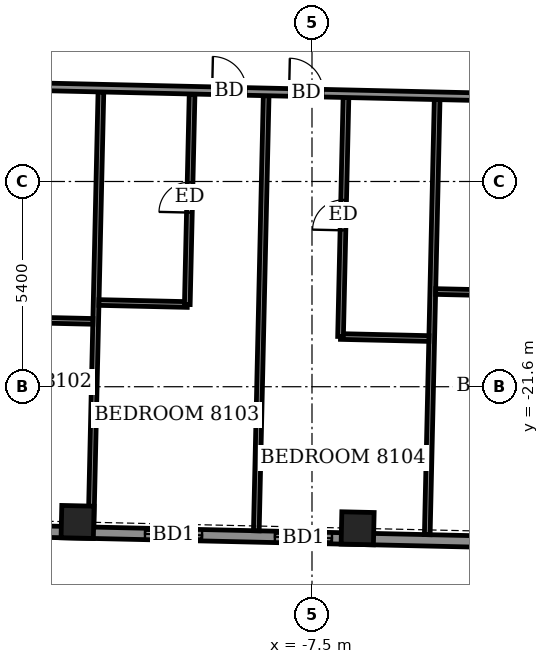
"""IFC4 building model, lengths in metres.
Left out: names, types, materials, properties, quantities, classifications, styles, units other than length and angle.
Written with IfcOpenShell. Run it as: python <this file> out.ifc"""

import sys

from ifc_helpers import new_model, si_unit, direction, frame, frame_2d, origin, origin_2d, place, context, subcontext, project, spatial, rectangle, extrude, element, fill, save


model = new_model("IFC4")
c1 = context("Model", 3, precision=1e-05, world=origin(), true_north=direction((0.0, 1.0)))
c2 = subcontext(c1, "Body", "Model", "MODEL_VIEW")
j1 = project(units=[si_unit("LENGTHUNIT", "METRE"), si_unit("PLANEANGLEUNIT", "RADIAN")], contexts=[c1])
p1 = place(None, origin())
s1 = spatial("IfcSite", under=j1, at=p1, CompositionType="ELEMENT")
p2 = place(p1, origin())
s2 = spatial("IfcBuilding", under=s1, at=p2, CompositionType="ELEMENT")
p3 = place(p2, frame((0.0, 0.0, 316.9)))
s3 = spatial("IfcBuildingStorey", under=s2, at=p3, CompositionType="ELEMENT", Elevation=316.9)
for number, where, z_axis, x_axis in (
    (1, (-13.668, -25.158, -0.55), (0.0, 0.0, 1.0), (1.0, -0.023, 0.0)),
    (2, (-6.299, -25.325, -0.55), (0.0, 0.0, 1.0), (1.0, -0.023, 0.0)),
):
    element("IfcColumn", number, at=place(p3, frame(where, z_axis=z_axis, x_axis=x_axis)), inside=s3, PredefinedType="COLUMN", context=c2, shape_type="SweptSolid", body=[
        extrude(rectangle(XDim=0.85, YDim=0.85, at=origin_2d()), origin(), (0.0, 0.0, 1.0), 3.6),
    ])
p4 = place(p3, frame((-28.264, -25.102, 0.0), z_axis=(0.0, 0.0, 1.0), x_axis=(0.999742520573, -0.022691244094, 0.0)))
e3 = element("IfcWall", 3, at=p4, inside=s3, PredefinedType="SOLIDWALL", context=c2, shape_type="SweptSolid", body=[
    extrude(rectangle(XDim=51.3, YDim=0.3, at=frame_2d((25.65, 0.0))), origin(), (0.0, 0.0, 1.0), 2.5),
])
p5 = place(p4, frame((2.455, 0.0, 0.0)))
e4 = element("IfcOpeningElement", 4, at=p5, cuts=e3, PredefinedType="OPENING", context=c2, shape_type="SweptSolid", body=[
    extrude(rectangle(XDim=1.5, YDim=2.4, at=frame_2d((0.75, 1.2))), frame((0.0, 0.16, 0.0), z_axis=(0.0, -1.0, 0.0), x_axis=(1.0, 0.0, 0.0)), (0.0, 0.0, 1.0), 0.32),
])
p6 = place(p4, frame((8.198, 0.0, 0.0)))
e5 = element("IfcOpeningElement", 5, at=p6, cuts=e3, PredefinedType="OPENING", context=c2, shape_type="SweptSolid", body=[
    extrude(rectangle(XDim=1.5, YDim=2.4, at=frame_2d((0.75, 1.2))), frame((0.0, 0.16, 0.0), z_axis=(0.0, -1.0, 0.0), x_axis=(1.0, 0.0, 0.0)), (0.0, 0.0, 1.0), 0.32),
])
p7 = place(p4, frame((11.709, 0.0, 0.0)))
e6 = element("IfcOpeningElement", 6, at=p7, cuts=e3, PredefinedType="OPENING", context=c2, shape_type="SweptSolid", body=[
    extrude(rectangle(XDim=1.5, YDim=2.4, at=frame_2d((0.75, 1.2))), frame((0.0, 0.16, 0.0), z_axis=(0.0, -1.0, 0.0), x_axis=(1.0, 0.0, 0.0)), (0.0, 0.0, 1.0), 0.32),
])
p8 = place(p4, frame((16.375, 0.0, 0.0)))
e7 = element("IfcOpeningElement", 7, at=p8, cuts=e3, PredefinedType="OPENING", context=c2, shape_type="SweptSolid", body=[
    extrude(rectangle(XDim=1.5, YDim=2.4, at=frame_2d((0.75, 1.2))), frame((0.0, 0.16, 0.0), z_axis=(0.0, -1.0, 0.0), x_axis=(1.0, 0.0, 0.0)), (0.0, 0.0, 1.0), 0.32),
])
p9 = place(p4, frame((19.794, 0.0, 0.0)))
e8 = element("IfcOpeningElement", 8, at=p9, cuts=e3, PredefinedType="OPENING", context=c2, shape_type="SweptSolid", body=[
    extrude(rectangle(XDim=1.5, YDim=2.4, at=frame_2d((0.75, 1.2))), frame((0.0, 0.16, 0.0), z_axis=(0.0, -1.0, 0.0), x_axis=(1.0, 0.0, 0.0)), (0.0, 0.0, 1.0), 0.32),
])
p10 = place(p4, frame((25.175, 0.0, 0.0)))
e9 = element("IfcOpeningElement", 9, at=p10, cuts=e3, PredefinedType="OPENING", context=c2, shape_type="SweptSolid", body=[
    extrude(rectangle(XDim=1.5, YDim=2.4, at=frame_2d((0.75, 1.2))), frame((0.0, 0.16, 0.0), z_axis=(0.0, -1.0, 0.0), x_axis=(1.0, 0.0, 0.0)), (0.0, 0.0, 1.0), 0.32),
])
p11 = place(p4, frame((30.305, 0.0, 0.0)))
e10 = element("IfcOpeningElement", 10, at=p11, cuts=e3, PredefinedType="OPENING", context=c2, shape_type="SweptSolid", body=[
    extrude(rectangle(XDim=1.5, YDim=2.4, at=frame_2d((0.75, 1.2))), frame((0.0, 0.16, 0.0), z_axis=(0.0, -1.0, 0.0), x_axis=(1.0, 0.0, 0.0)), (0.0, 0.0, 1.0), 0.32),
])
p12 = place(p4, frame((33.816, 0.0, 0.0)))
e11 = element("IfcOpeningElement", 11, at=p12, cuts=e3, PredefinedType="OPENING", context=c2, shape_type="SweptSolid", body=[
    extrude(rectangle(XDim=1.5, YDim=2.4, at=frame_2d((0.75, 1.2))), frame((0.0, 0.16, 0.0), z_axis=(0.0, -1.0, 0.0), x_axis=(1.0, 0.0, 0.0)), (0.0, 0.0, 1.0), 0.32),
])
p13 = place(p4, frame((38.6, 0.0, 0.0)))
e12 = element("IfcOpeningElement", 12, at=p13, cuts=e3, PredefinedType="OPENING", context=c2, shape_type="SweptSolid", body=[
    extrude(rectangle(XDim=1.5, YDim=2.4, at=frame_2d((0.75, 1.2))), frame((0.0, 0.16, 0.0), z_axis=(0.0, -1.0, 0.0), x_axis=(1.0, 0.0, 0.0)), (0.0, 0.0, 1.0), 0.32),
])
p14 = place(p4, frame((42.002, 0.0, 0.0)))
e13 = element("IfcOpeningElement", 13, at=p14, cuts=e3, PredefinedType="OPENING", context=c2, shape_type="SweptSolid", body=[
    extrude(rectangle(XDim=1.5, YDim=2.4, at=frame_2d((0.75, 1.2))), frame((0.0, 0.16, 0.0), z_axis=(0.0, -1.0, 0.0), x_axis=(1.0, 0.0, 0.0)), (0.0, 0.0, 1.0), 0.32),
])
p15 = place(p4, frame((47.228, 0.0, 0.9)))
e14 = element("IfcOpeningElement", 14, at=p15, cuts=e3, PredefinedType="OPENING", context=c2, shape_type="SweptSolid", body=[
    extrude(rectangle(XDim=2.4, YDim=1.5, at=frame_2d((1.2, 0.75))), frame((0.0, 0.16, 0.0), z_axis=(0.0, -1.0, 0.0), x_axis=(1.0, 0.0, 0.0)), (0.0, 0.0, 1.0), 0.32),
])
p16 = place(p3, frame((-13.314, -25.291, 0.0), z_axis=(0.0, 0.0, 1.0), x_axis=(0.022708327922, 0.999742132674, 0.0)))
e15 = element("IfcWall", 15, at=p16, inside=s3, PredefinedType="PARTITIONING", context=c2, shape_type="SweptSolid", body=[
    extrude(rectangle(XDim=11.45, YDim=0.15, at=frame_2d((5.725, 0.0))), origin(), (0.0, 0.0, 1.0), 2.5),
])
p17 = place(p3, frame((-8.965, -25.39, 0.0), z_axis=(0.0, 0.0, 1.0), x_axis=(0.022623564427, 0.999744054412, 0.0)))
e16 = element("IfcWall", 16, at=p17, inside=s3, PredefinedType="PARTITIONING", context=c2, shape_type="SweptSolid", body=[
    extrude(rectangle(XDim=11.45, YDim=0.15, at=frame_2d((5.725, 0.0))), origin(), (0.0, 0.0, 1.0), 2.5),
])
p18 = place(p3, frame((-4.467, -25.492, 0.0), z_axis=(0.0, 0.0, 1.0), x_axis=(0.022708327922, 0.999742132674, 0.0)))
e17 = element("IfcWall", 17, at=p18, inside=s3, PredefinedType="PARTITIONING", context=c2, shape_type="SweptSolid", body=[
    extrude(rectangle(XDim=11.45, YDim=0.15, at=frame_2d((5.725, 0.0))), origin(), (0.0, 0.0, 1.0), 2.5),
])
p19 = place(p3, frame((-6.749, -20.279, 0.0), z_axis=(0.0, 0.0, 1.0), x_axis=(0.999740478815, -0.022781023197, 0.0)))
e18 = element("IfcWall", 18, at=p19, inside=s3, PredefinedType="PARTITIONING", context=c2, shape_type="SweptSolid", body=[
    extrude(rectangle(XDim=2.325, YDim=0.15, at=frame_2d((1.163, 0.0))), origin(), (0.0, 0.0, 1.0), 3.05),
])
p20 = place(p3, frame((-6.749, -20.279, 0.0), z_axis=(0.0, 0.0, 1.0), x_axis=(0.02274256342, 0.999741354456, 0.0)))
e19 = element("IfcWall", 19, at=p20, inside=s3, PredefinedType="PARTITIONING", context=c2, shape_type="SweptSolid", body=[
    extrude(rectangle(XDim=6.291, YDim=0.15, at=frame_2d((3.146, 0.0))), origin(), (0.0, 0.0, 1.0), 3.05),
])
p21 = place(p20, frame((2.795, 0.0, 0.0)))
e20 = element("IfcOpeningElement", 20, at=p21, cuts=e19, PredefinedType="OPENING", context=c2, shape_type="SweptSolid", body=[
    extrude(rectangle(XDim=0.8, YDim=2.1, at=frame_2d((0.4, 1.05))), frame((0.0, 0.085, 0.0), z_axis=(0.0, -1.0, 0.0), x_axis=(1.0, 0.0, 0.0)), (0.0, 0.0, 1.0), 0.17),
])
p22 = place(p3, frame((-15.591, -19.828, 0.0), z_axis=(0.0, 0.0, 1.0), x_axis=(0.999738082346, -0.022885950011, 0.0)))
e21 = element("IfcWall", 21, at=p22, inside=s3, PredefinedType="PARTITIONING", context=c2, shape_type="SweptSolid", body=[
    extrude(rectangle(XDim=2.325, YDim=0.15, at=frame_2d((1.163, 0.0))), origin(), (0.0, 0.0, 1.0), 3.05),
])
p23 = place(p3, frame((-13.105, -19.384, 0.0), z_axis=(0.0, 0.0, 1.0), x_axis=(0.999740260747, -0.02279059109, 0.0)))
e22 = element("IfcWall", 22, at=p23, inside=s3, PredefinedType="PARTITIONING", context=c2, shape_type="SweptSolid", body=[
    extrude(rectangle(XDim=2.324, YDim=0.15, at=frame_2d((1.162, 0.0))), origin(), (0.0, 0.0, 1.0), 3.05),
])
p24 = place(p3, frame((-10.781, -19.437, 0.0), z_axis=(0.0, 0.0, 1.0), x_axis=(0.022741427977, 0.999741380285, 0.0)))
e23 = element("IfcWall", 23, at=p24, inside=s3, PredefinedType="PARTITIONING", context=c2, shape_type="SweptSolid", body=[
    extrude(rectangle(XDim=5.54, YDim=0.15, at=frame_2d((2.77, 0.0))), origin(), (0.0, 0.0, 1.0), 3.05),
])
p25 = place(p24, frame((2.42, 0.0, 0.0)))
e24 = element("IfcOpeningElement", 24, at=p25, cuts=e23, PredefinedType="OPENING", context=c2, shape_type="SweptSolid", body=[
    extrude(rectangle(XDim=0.8, YDim=2.1, at=frame_2d((0.4, 1.05))), frame((0.0, 0.085, 0.0), z_axis=(0.0, -1.0, 0.0), x_axis=(1.0, 0.0, 0.0)), (0.0, 0.0, 1.0), 0.17),
])
p26 = place(p3, frame((-4.246, -19.095, 0.0), z_axis=(0.0, 0.0, 1.0), x_axis=(0.999740260747, -0.02279059109, 0.0)))
e25 = element("IfcWall", 25, at=p26, inside=s3, PredefinedType="PARTITIONING", context=c2, shape_type="SweptSolid", body=[
    extrude(rectangle(XDim=2.324, YDim=0.15, at=frame_2d((1.162, 0.0))), origin(), (0.0, 0.0, 1.0), 3.05),
])
p27 = place(p3, frame((-31.347, -13.329, 0.0), z_axis=(0.0, 0.0, 1.0), x_axis=(0.999742613079, -0.022687168058, 0.0)))
e26 = element("IfcWall", 26, at=p27, inside=s3, PredefinedType="PARTITIONING", context=c2, shape_type="SweptSolid", body=[
    extrude(rectangle(XDim=58.799, YDim=0.2, at=frame_2d((29.399, 0.0))), origin(), (0.0, 0.0, 1.0), 3.05),
])
p28 = place(p27, frame((2.075, 0.0, 0.0)))
e27 = element("IfcOpeningElement", 27, at=p28, cuts=e26, PredefinedType="OPENING", context=c2, shape_type="SweptSolid", body=[
    extrude(rectangle(XDim=1.0, YDim=2.1, at=frame_2d((0.5, 1.05))), frame((0.0, 0.11, 0.0), z_axis=(0.0, -1.0, 0.0), x_axis=(1.0, 0.0, 0.0)), (0.0, 0.0, 1.0), 0.22),
])
p29 = place(p27, frame((7.5, 0.0, 0.0)))
e28 = element("IfcOpeningElement", 28, at=p29, cuts=e26, PredefinedType="OPENING", context=c2, shape_type="SweptSolid", body=[
    extrude(rectangle(XDim=0.9, YDim=2.1, at=frame_2d((0.45, 1.05))), frame((0.0, 0.11, 0.0), z_axis=(0.0, -1.0, 0.0), x_axis=(1.0, 0.0, 0.0)), (0.0, 0.0, 1.0), 0.22),
])
p30 = place(p27, frame((12.35, 0.0, 0.0)))
e29 = element("IfcOpeningElement", 29, at=p30, cuts=e26, PredefinedType="OPENING", context=c2, shape_type="SweptSolid", body=[
    extrude(rectangle(XDim=0.9, YDim=2.1, at=frame_2d((0.45, 1.05))), frame((0.0, 0.11, 0.0), z_axis=(0.0, -1.0, 0.0), x_axis=(1.0, 0.0, 0.0)), (0.0, 0.0, 1.0), 0.22),
])
p31 = place(p27, frame((14.425, 0.0, 0.0)))
e30 = element("IfcOpeningElement", 30, at=p31, cuts=e26, PredefinedType="OPENING", context=c2, shape_type="SweptSolid", body=[
    extrude(rectangle(XDim=0.9, YDim=2.1, at=frame_2d((0.45, 1.05))), frame((0.0, 0.11, 0.0), z_axis=(0.0, -1.0, 0.0), x_axis=(1.0, 0.0, 0.0)), (0.0, 0.0, 1.0), 0.22),
])
p32 = place(p27, frame((21.225, 0.0, 0.0)))
e31 = element("IfcOpeningElement", 31, at=p32, cuts=e26, PredefinedType="OPENING", context=c2, shape_type="SweptSolid", body=[
    extrude(rectangle(XDim=0.9, YDim=2.1, at=frame_2d((0.45, 1.05))), frame((0.0, 0.11, 0.0), z_axis=(0.0, -1.0, 0.0), x_axis=(1.0, 0.0, 0.0)), (0.0, 0.0, 1.0), 0.22),
])
p33 = place(p27, frame((23.25, 0.0, 0.0)))
e32 = element("IfcOpeningElement", 32, at=p33, cuts=e26, PredefinedType="OPENING", context=c2, shape_type="SweptSolid", body=[
    extrude(rectangle(XDim=0.9, YDim=2.1, at=frame_2d((0.45, 1.05))), frame((0.0, 0.11, 0.0), z_axis=(0.0, -1.0, 0.0), x_axis=(1.0, 0.0, 0.0)), (0.0, 0.0, 1.0), 0.22),
])
p34 = place(p27, frame((30.025, 0.0, 0.0)))
e33 = element("IfcOpeningElement", 33, at=p34, cuts=e26, PredefinedType="OPENING", context=c2, shape_type="SweptSolid", body=[
    extrude(rectangle(XDim=0.9, YDim=2.1, at=frame_2d((0.45, 1.05))), frame((0.0, 0.11, 0.0), z_axis=(0.0, -1.0, 0.0), x_axis=(1.0, 0.0, 0.0)), (0.0, 0.0, 1.0), 0.22),
])
p35 = place(p27, frame((32.025, 0.0, 0.0)))
e34 = element("IfcOpeningElement", 34, at=p35, cuts=e26, PredefinedType="OPENING", context=c2, shape_type="SweptSolid", body=[
    extrude(rectangle(XDim=0.9, YDim=2.1, at=frame_2d((0.45, 1.05))), frame((0.0, 0.11, 0.0), z_axis=(0.0, -1.0, 0.0), x_axis=(1.0, 0.0, 0.0)), (0.0, 0.0, 1.0), 0.22),
])
p36 = place(p27, frame((38.95, 0.0, 0.0)))
e35 = element("IfcOpeningElement", 35, at=p36, cuts=e26, PredefinedType="OPENING", context=c2, shape_type="SweptSolid", body=[
    extrude(rectangle(XDim=0.9, YDim=2.1, at=frame_2d((0.45, 1.05))), frame((0.0, 0.11, 0.0), z_axis=(0.0, -1.0, 0.0), x_axis=(1.0, 0.0, 0.0)), (0.0, 0.0, 1.0), 0.22),
])
p37 = place(p27, frame((41.05, 0.0, 0.0)))
e36 = element("IfcOpeningElement", 36, at=p37, cuts=e26, PredefinedType="OPENING", context=c2, shape_type="SweptSolid", body=[
    extrude(rectangle(XDim=0.9, YDim=2.1, at=frame_2d((0.45, 1.05))), frame((0.0, 0.11, 0.0), z_axis=(0.0, -1.0, 0.0), x_axis=(1.0, 0.0, 0.0)), (0.0, 0.0, 1.0), 0.22),
])
p38 = place(p27, frame((47.925, 0.0, 0.0)))
e37 = element("IfcOpeningElement", 37, at=p38, cuts=e26, PredefinedType="OPENING", context=c2, shape_type="SweptSolid", body=[
    extrude(rectangle(XDim=0.9, YDim=2.1, at=frame_2d((0.45, 1.05))), frame((0.0, 0.11, 0.0), z_axis=(0.0, -1.0, 0.0), x_axis=(1.0, 0.0, 0.0)), (0.0, 0.0, 1.0), 0.22),
])
p39 = place(p27, frame((53.618, 0.0, 0.0)))
e38 = element("IfcOpeningElement", 38, at=p39, cuts=e26, PredefinedType="OPENING", context=c2, shape_type="SweptSolid", body=[
    extrude(rectangle(XDim=1.0, YDim=2.1, at=frame_2d((0.5, 1.05))), frame((0.0, 0.11, 0.0), z_axis=(0.0, -1.0, 0.0), x_axis=(1.0, 0.0, 0.0)), (0.0, 0.0, 1.0), 0.22),
])
p40 = place(p8, origin())
e39 = element("IfcDoor", 39, at=p40, inside=s3, OperationType="SLIDING_TO_LEFT", PredefinedType="DOOR", context=c2, shape_type="SweptSolid", body=[
    extrude(rectangle(XDim=1.5, YDim=2.4, at=frame_2d((0.75, 1.2))), frame((0.0, 0.025, 0.0), z_axis=(0.0, -1.0, 0.0), x_axis=(1.0, 0.0, 0.0)), (0.0, 0.0, 1.0), 0.05),
])
fill(e7, e39)
p41 = place(p9, origin())
e40 = element("IfcDoor", 40, at=p41, inside=s3, OperationType="SLIDING_TO_LEFT", PredefinedType="DOOR", context=c2, shape_type="SweptSolid", body=[
    extrude(rectangle(XDim=1.5, YDim=2.4, at=frame_2d((0.75, 1.2))), frame((0.0, 0.025, 0.0), z_axis=(0.0, -1.0, 0.0), x_axis=(1.0, 0.0, 0.0)), (0.0, 0.0, 1.0), 0.05),
])
fill(e8, e40)
p42 = place(p32, origin())
e41 = element("IfcDoor", 41, at=p42, inside=s3, OperationType="SINGLE_SWING_LEFT", PredefinedType="DOOR", context=c2, shape_type="SweptSolid", body=[
    extrude(rectangle(XDim=0.9, YDim=2.1, at=frame_2d((0.45, 1.05))), frame((0.0, 0.025, 0.0), z_axis=(0.0, -1.0, 0.0), x_axis=(1.0, 0.0, 0.0)), (0.0, 0.0, 1.0), 0.05),
])
fill(e31, e41)
p43 = place(p25, origin())
e42 = element("IfcDoor", 42, at=p43, inside=s3, OperationType="SINGLE_SWING_LEFT", PredefinedType="DOOR", context=c2, shape_type="SweptSolid", body=[
    extrude(rectangle(XDim=0.8, YDim=2.1, at=frame_2d((0.4, 1.05))), frame((0.0, 0.025, 0.0), z_axis=(0.0, -1.0, 0.0), x_axis=(1.0, 0.0, 0.0)), (0.0, 0.0, 1.0), 0.05),
])
fill(e24, e42)
p44 = place(p33, origin())
e43 = element("IfcDoor", 43, at=p44, inside=s3, OperationType="SINGLE_SWING_RIGHT", PredefinedType="DOOR", context=c2, shape_type="SweptSolid", body=[
    extrude(rectangle(XDim=0.9, YDim=2.1, at=frame_2d((0.45, 1.05))), frame((0.0, 0.025, 0.0), z_axis=(0.0, -1.0, 0.0), x_axis=(1.0, 0.0, 0.0)), (0.0, 0.0, 1.0), 0.05),
])
fill(e32, e43)
p45 = place(p21, origin())
e44 = element("IfcDoor", 44, at=p45, inside=s3, OperationType="SINGLE_SWING_RIGHT", PredefinedType="DOOR", context=c2, shape_type="SweptSolid", body=[
    extrude(rectangle(XDim=0.8, YDim=2.1, at=frame_2d((0.4, 1.05))), frame((0.0, 0.025, 0.0), z_axis=(0.0, -1.0, 0.0), x_axis=(1.0, 0.0, 0.0)), (0.0, 0.0, 1.0), 0.05),
])
fill(e20, e44)
save(model, sys.argv[1])
